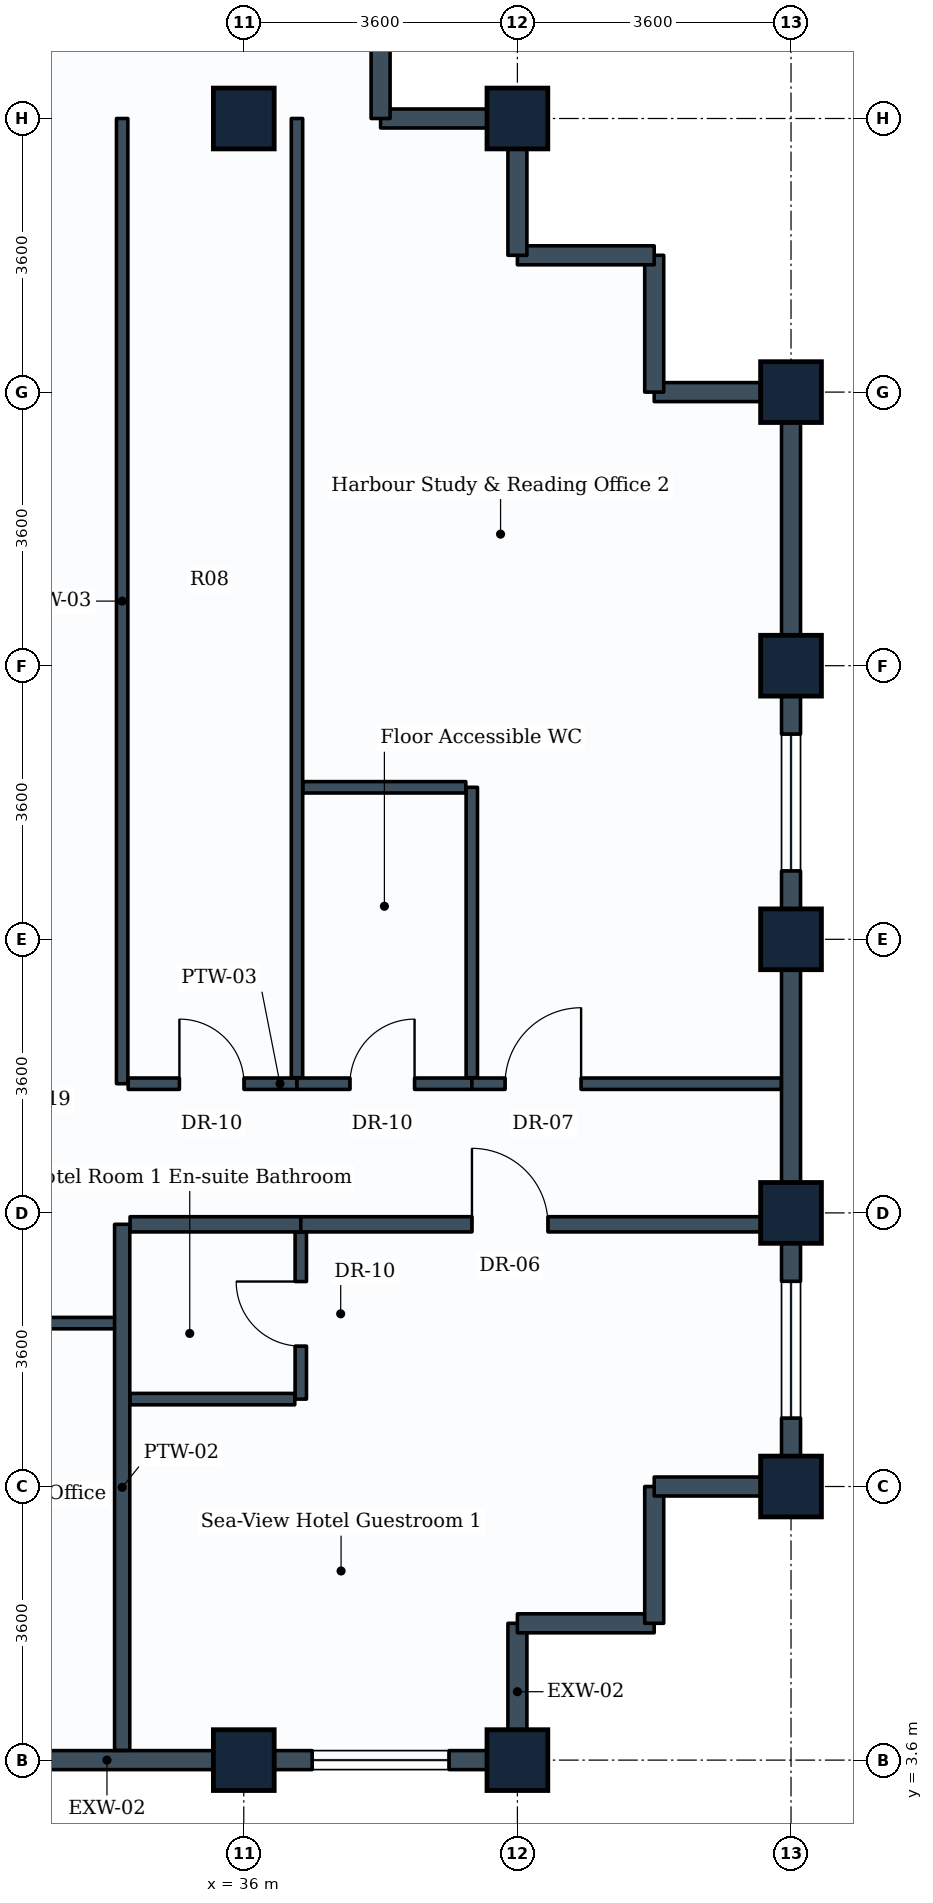
"""IFC4 building model, lengths in metres.
Left out: names, types, materials, properties, quantities, classifications, styles, units other than length and angle.
Written with IfcOpenShell. Run it as: python <this file> out.ifc"""

import sys

from ifc_helpers import new_model, si_unit, direction, frame, frame_2d, origin, origin_2d, place, context, subcontext, project, spatial, rectangle, extrude, element, fill, save


model = new_model("IFC4")
c1 = context("Model", 3, precision=1e-05, world=origin(), true_north=direction((0.0, 1.0)))
c2 = subcontext(c1, "Body", "Model", "MODEL_VIEW")
j1 = project(units=[si_unit("LENGTHUNIT", "METRE"), si_unit("PLANEANGLEUNIT", "RADIAN")], contexts=[c1])
p1 = place(None, origin())
s1 = spatial("IfcSite", under=j1, at=p1, CompositionType="ELEMENT")
p2 = place(p1, origin())
s2 = spatial("IfcBuilding", under=s1, at=p2, CompositionType="ELEMENT")
p3 = place(p2, frame((0.0, 0.0, 281.0)))
s3 = spatial("IfcBuildingStorey", under=s2, at=p3, CompositionType="ELEMENT", Elevation=281.0)
for number, where, z_axis, x_axis in (
    (1, (36.0, 3.6, 0.0), (0.0, 0.0, 1.0), (1.0, 0.0, 0.0)),
    (2, (36.0, 25.2, 0.0), (0.0, 0.0, 1.0), (1.0, 0.0, 0.0)),
    (3, (39.6, 3.6, 0.0), (0.0, 0.0, 1.0), (1.0, 0.0, 0.0)),
    (4, (39.6, 25.2, 0.0), (0.0, 0.0, 1.0), (1.0, 0.0, 0.0)),
    (5, (43.2, 7.2, 0.0), (0.0, 0.0, 1.0), (1.0, 0.0, 0.0)),
    (6, (43.2, 10.8, 0.0), (0.0, 0.0, 1.0), (0.0, 1.0, 0.0)),
    (7, (43.2, 14.4, 0.0), (0.0, 0.0, 1.0), (0.0, 1.0, 0.0)),
    (8, (43.2, 18.0, 0.0), (0.0, 0.0, 1.0), (0.0, 1.0, 0.0)),
    (9, (43.2, 21.6, 0.0), (0.0, 0.0, 1.0), (0.0, 1.0, 0.0)),
):
    element("IfcColumn", number, at=place(p3, frame(where, z_axis=z_axis, x_axis=x_axis)), inside=s3, PredefinedType="COLUMN", context=c2, shape_type="SweptSolid", body=[
        extrude(rectangle(XDim=0.8, YDim=0.8, at=origin_2d()), origin(), (0.0, 0.0, 1.0), 3.6),
    ])
p4 = place(p3, frame((36.0, 3.6, 0.0), z_axis=(0.0, 0.0, 1.0), x_axis=(-1.0, 0.0, 0.0)))
e10 = element("IfcWall", 10, at=p4, inside=s3, PredefinedType="STANDARD", context=c2, shape_type="SweptSolid", body=[
    extrude(rectangle(XDim=3.6, YDim=0.25, at=frame_2d((1.8, 0.0))), origin(), (0.0, 0.0, 1.0), 2.83),
])
p5 = place(p3, frame((39.6, 3.6, 0.0), z_axis=(0.0, 0.0, 1.0), x_axis=(-1.0, 0.0, 0.0)))
e11 = element("IfcWall", 11, at=p5, inside=s3, PredefinedType="STANDARD", context=c2, shape_type="SweptSolid", body=[
    extrude(rectangle(XDim=3.6, YDim=0.25, at=frame_2d((1.8, 0.0))), origin(), (0.0, 0.0, 1.0), 2.83),
])
p6 = place(p5, frame((0.9, 0.0, 0.85)))
e12 = element("IfcOpeningElement", 12, at=p6, cuts=e11, PredefinedType="OPENING", context=c2, shape_type="SweptSolid", body=[
    extrude(rectangle(XDim=1.8, YDim=1.35, at=frame_2d((0.9, 0.675))), frame((0.0, 0.135, 0.0), z_axis=(0.0, -1.0, 0.0), x_axis=(1.0, 0.0, 0.0)), (0.0, 0.0, 1.0), 0.27),
])
p7 = place(p3, frame((39.6, 5.4, 0.0), z_axis=(0.0, 0.0, 1.0), x_axis=(0.0, -1.0, 0.0)))
e13 = element("IfcWall", 13, at=p7, inside=s3, PredefinedType="STANDARD", context=c2, shape_type="SweptSolid", body=[
    extrude(rectangle(XDim=1.8, YDim=0.25, at=frame_2d((0.9, 0.0))), origin(), (0.0, 0.0, 1.0), 2.83),
])
p8 = place(p3, frame((41.4, 5.4, 0.0), z_axis=(0.0, 0.0, 1.0), x_axis=(-1.0, 0.0, 0.0)))
e14 = element("IfcWall", 14, at=p8, inside=s3, PredefinedType="STANDARD", context=c2, shape_type="SweptSolid", body=[
    extrude(rectangle(XDim=1.8, YDim=0.25, at=frame_2d((0.9, 0.0))), origin(), (0.0, 0.0, 1.0), 3.335),
])
p9 = place(p3, frame((41.4, 7.2, 0.0), z_axis=(0.0, 0.0, 1.0), x_axis=(0.0, -1.0, 0.0)))
e15 = element("IfcWall", 15, at=p9, inside=s3, PredefinedType="STANDARD", context=c2, shape_type="SweptSolid", body=[
    extrude(rectangle(XDim=1.8, YDim=0.25, at=frame_2d((0.9, 0.0))), origin(), (0.0, 0.0, 1.0), 3.335),
])
p10 = place(p3, frame((43.2, 7.2, 0.0), z_axis=(0.0, 0.0, 1.0), x_axis=(-1.0, 0.0, 0.0)))
e16 = element("IfcWall", 16, at=p10, inside=s3, PredefinedType="STANDARD", context=c2, shape_type="SweptSolid", body=[
    extrude(rectangle(XDim=1.8, YDim=0.25, at=frame_2d((0.9, 0.0))), origin(), (0.0, 0.0, 1.0), 2.83),
])
p11 = place(p3, frame((43.2, 10.8, 0.0), z_axis=(0.0, 0.0, 1.0), x_axis=(0.0, -1.0, 0.0)))
e17 = element("IfcWall", 17, at=p11, inside=s3, PredefinedType="STANDARD", context=c2, shape_type="SweptSolid", body=[
    extrude(rectangle(XDim=3.6, YDim=0.25, at=frame_2d((1.8, 0.0))), origin(), (0.0, 0.0, 1.0), 2.83),
])
p12 = place(p11, frame((0.9, 0.0, 0.85)))
e18 = element("IfcOpeningElement", 18, at=p12, cuts=e17, PredefinedType="OPENING", context=c2, shape_type="SweptSolid", body=[
    extrude(rectangle(XDim=1.8, YDim=1.35, at=frame_2d((0.9, 0.675))), frame((0.0, 0.135, 0.0), z_axis=(0.0, -1.0, 0.0), x_axis=(1.0, 0.0, 0.0)), (0.0, 0.0, 1.0), 0.27),
])
p13 = place(p3, frame((43.2, 14.4, 0.0), z_axis=(0.0, 0.0, 1.0), x_axis=(0.0, -1.0, 0.0)))
e19 = element("IfcWall", 19, at=p13, inside=s3, PredefinedType="STANDARD", context=c2, shape_type="SweptSolid", body=[
    extrude(rectangle(XDim=3.6, YDim=0.25, at=frame_2d((1.8, 0.0))), origin(), (0.0, 0.0, 1.0), 2.83),
])
p14 = place(p3, frame((43.2, 18.0, 0.0), z_axis=(0.0, 0.0, 1.0), x_axis=(0.0, -1.0, 0.0)))
e20 = element("IfcWall", 20, at=p14, inside=s3, PredefinedType="STANDARD", context=c2, shape_type="SweptSolid", body=[
    extrude(rectangle(XDim=3.6, YDim=0.25, at=frame_2d((1.8, 0.0))), origin(), (0.0, 0.0, 1.0), 2.83),
])
p15 = place(p14, frame((0.9, 0.0, 0.85)))
e21 = element("IfcOpeningElement", 21, at=p15, cuts=e20, PredefinedType="OPENING", context=c2, shape_type="SweptSolid", body=[
    extrude(rectangle(XDim=1.8, YDim=1.35, at=frame_2d((0.9, 0.675))), frame((0.0, 0.135, 0.0), z_axis=(0.0, -1.0, 0.0), x_axis=(1.0, 0.0, 0.0)), (0.0, 0.0, 1.0), 0.27),
])
p16 = place(p3, frame((43.2, 21.6, 0.0), z_axis=(0.0, 0.0, 1.0), x_axis=(0.0, -1.0, 0.0)))
e22 = element("IfcWall", 22, at=p16, inside=s3, PredefinedType="STANDARD", context=c2, shape_type="SweptSolid", body=[
    extrude(rectangle(XDim=3.6, YDim=0.25, at=frame_2d((1.8, 0.0))), origin(), (0.0, 0.0, 1.0), 2.83),
])
p17 = place(p3, frame((41.4, 21.6, 0.0), z_axis=(0.0, 0.0, 1.0), x_axis=(1.0, 0.0, 0.0)))
e23 = element("IfcWall", 23, at=p17, inside=s3, PredefinedType="STANDARD", context=c2, shape_type="SweptSolid", body=[
    extrude(rectangle(XDim=1.8, YDim=0.25, at=frame_2d((0.9, 0.0))), origin(), (0.0, 0.0, 1.0), 2.83),
])
for number, where, z_axis, x_axis in (
    (24, (41.4, 23.4, 0.0), (0.0, 0.0, 1.0), (0.0, -1.0, 0.0)),
    (25, (39.6, 23.4, 0.0), (0.0, 0.0, 1.0), (1.0, 0.0, 0.0)),
):
    element("IfcWall", number, at=place(p3, frame(where, z_axis=z_axis, x_axis=x_axis)), inside=s3, PredefinedType="STANDARD", context=c2, shape_type="SweptSolid", body=[
        extrude(rectangle(XDim=1.8, YDim=0.25, at=frame_2d((0.9, 0.0))), origin(), (0.0, 0.0, 1.0), 3.335),
    ])
for number, where, z_axis, x_axis in (
    (26, (39.6, 25.2, 0.0), (0.0, 0.0, 1.0), (0.0, -1.0, 0.0)),
    (27, (37.8, 25.2, 0.0), (0.0, 0.0, 1.0), (1.0, 0.0, 0.0)),
):
    element("IfcWall", number, at=place(p3, frame(where, z_axis=z_axis, x_axis=x_axis)), inside=s3, PredefinedType="STANDARD", context=c2, shape_type="SweptSolid", body=[
        extrude(rectangle(XDim=1.8, YDim=0.25, at=frame_2d((0.9, 0.0))), origin(), (0.0, 0.0, 1.0), 2.83),
    ])
p18 = place(p3, frame((37.8, 27.3, 0.0), z_axis=(0.0, 0.0, 1.0), x_axis=(0.0, -1.0, 0.0)))
e28 = element("IfcWall", 28, at=p18, inside=s3, PredefinedType="STANDARD", context=c2, shape_type="SweptSolid", body=[
    extrude(rectangle(XDim=2.1, YDim=0.25, at=frame_2d((1.05, 0.0))), origin(), (0.0, 0.0, 1.0), 2.83),
])
p19 = place(p3, frame((34.4, 12.5, 0.0), z_axis=(0.0, 0.0, 1.0), x_axis=(0.0, 1.0, 0.0)))
e29 = element("IfcWall", 29, at=p19, inside=s3, PredefinedType="PARTITIONING", context=c2, shape_type="SweptSolid", body=[
    extrude(rectangle(XDim=12.7, YDim=0.15, at=frame_2d((6.35, 0.0))), origin(), (0.0, 0.0, 1.0), 2.83),
])
p20 = place(p3, frame((34.479, 12.5, 0.0), z_axis=(0.0, 0.0, 1.0), x_axis=(1.0, 0.0, 0.0)))
e30 = element("IfcWall", 30, at=p20, inside=s3, PredefinedType="PARTITIONING", context=c2, shape_type="SweptSolid", body=[
    extrude(rectangle(XDim=2.221, YDim=0.15, at=frame_2d((1.11, 0.0))), origin(), (0.0, 0.0, 1.0), 3.02),
])
p21 = place(p20, frame((0.674, 0.0, 0.0)))
e31 = element("IfcOpeningElement", 31, at=p21, cuts=e30, PredefinedType="OPENING", context=c2, shape_type="SweptSolid", body=[
    extrude(rectangle(XDim=0.85, YDim=2.1, at=frame_2d((0.425, 1.05))), frame((0.0, 0.085, 0.0), z_axis=(0.0, -1.0, 0.0), x_axis=(1.0, 0.0, 0.0)), (0.0, 0.0, 1.0), 0.17),
])
p22 = place(p3, frame((36.7, 12.579, 0.0), z_axis=(0.0, 0.0, 1.0), x_axis=(0.0, 1.0, 0.0)))
e32 = element("IfcWall", 32, at=p22, inside=s3, PredefinedType="PARTITIONING", context=c2, shape_type="SweptSolid", body=[
    extrude(rectangle(XDim=12.621, YDim=0.15, at=frame_2d((6.311, 0.0))), origin(), (0.0, 0.0, 1.0), 2.83),
])
p23 = place(p3, frame((36.7, 12.5, 0.0), z_axis=(0.0, 0.0, 1.0), x_axis=(1.0, 0.0, 0.0)))
e33 = element("IfcWall", 33, at=p23, inside=s3, PredefinedType="PARTITIONING", context=c2, shape_type="SweptSolid", body=[
    extrude(rectangle(XDim=2.3, YDim=0.15, at=frame_2d((1.15, 0.0))), origin(), (0.0, 0.0, 1.0), 3.335),
])
p24 = place(p23, frame((0.697, 0.0, 0.0)))
e34 = element("IfcOpeningElement", 34, at=p24, cuts=e33, PredefinedType="OPENING", context=c2, shape_type="SweptSolid", body=[
    extrude(rectangle(XDim=0.85, YDim=2.1, at=frame_2d((0.425, 1.05))), frame((0.0, 0.085, 0.0), z_axis=(0.0, -1.0, 0.0), x_axis=(1.0, 0.0, 0.0)), (0.0, 0.0, 1.0), 0.17),
])
p25 = place(p3, frame((39.0, 12.579, 0.0), z_axis=(0.0, 0.0, 1.0), x_axis=(0.0, 1.0, 0.0)))
e35 = element("IfcWall", 35, at=p25, inside=s3, PredefinedType="PARTITIONING", context=c2, shape_type="SweptSolid", body=[
    extrude(rectangle(XDim=3.821, YDim=0.15, at=frame_2d((1.91, 0.0))), origin(), (0.0, 0.0, 1.0), 3.03),
])
p26 = place(p3, frame((36.779, 16.4, 0.0), z_axis=(0.0, 0.0, 1.0), x_axis=(1.0, 0.0, 0.0)))
e36 = element("IfcWall", 36, at=p26, inside=s3, PredefinedType="PARTITIONING", context=c2, shape_type="SweptSolid", body=[
    extrude(rectangle(XDim=2.142, YDim=0.15, at=frame_2d((1.071, 0.0))), origin(), (0.0, 0.0, 1.0), 3.335),
])
p27 = place(p3, frame((28.879, 9.35, 0.0), z_axis=(0.0, 0.0, 1.0), x_axis=(1.0, 0.0, 0.0)))
e37 = element("IfcWall", 37, at=p27, inside=s3, PredefinedType="PARTITIONING", context=c2, shape_type="SweptSolid", body=[
    extrude(rectangle(XDim=5.521, YDim=0.15, at=frame_2d((2.76, 0.0))), origin(), (0.0, 0.0, 1.0), 3.335),
])
p28 = place(p27, frame((0.36, 0.0, 0.0)))
e38 = element("IfcOpeningElement", 38, at=p28, cuts=e37, PredefinedType="OPENING", context=c2, shape_type="SweptSolid", body=[
    extrude(rectangle(XDim=1.0, YDim=2.1, at=frame_2d((0.5, 1.05))), frame((0.0, 0.085, 0.0), z_axis=(0.0, -1.0, 0.0), x_axis=(1.0, 0.0, 0.0)), (0.0, 0.0, 1.0), 0.17),
])
p29 = place(p3, frame((34.4, 3.729, 0.0), z_axis=(0.0, 0.0, 1.0), x_axis=(0.0, 1.0, 0.0)))
e39 = element("IfcWall", 39, at=p29, inside=s3, PredefinedType="PARTITIONING", context=c2, shape_type="SweptSolid", body=[
    extrude(rectangle(XDim=6.921, YDim=0.2, at=frame_2d((3.46, 0.0))), origin(), (0.0, 0.0, 1.0), 2.83),
])
p30 = place(p3, frame((34.504, 10.65, 0.0), z_axis=(0.0, 0.0, 1.0), x_axis=(1.0, 0.0, 0.0)))
e40 = element("IfcWall", 40, at=p30, inside=s3, PredefinedType="PARTITIONING", context=c2, shape_type="SweptSolid", body=[
    extrude(rectangle(XDim=2.246, YDim=0.2, at=frame_2d((1.123, 0.0))), origin(), (0.0, 0.0, 1.0), 3.02),
])
p31 = place(p3, frame((36.75, 10.65, 0.0), z_axis=(0.0, 0.0, 1.0), x_axis=(1.0, 0.0, 0.0)))
e41 = element("IfcWall", 41, at=p31, inside=s3, PredefinedType="PARTITIONING", context=c2, shape_type="SweptSolid", body=[
    extrude(rectangle(XDim=6.321, YDim=0.2, at=frame_2d((3.161, 0.0))), origin(), (0.0, 0.0, 1.0), 2.83),
])
p32 = place(p31, frame((2.252, 0.0, 0.0)))
e42 = element("IfcOpeningElement", 42, at=p32, cuts=e41, PredefinedType="OPENING", context=c2, shape_type="SweptSolid", body=[
    extrude(rectangle(XDim=1.0, YDim=2.1, at=frame_2d((0.5, 1.05))), frame((0.0, 0.11, 0.0), z_axis=(0.0, -1.0, 0.0), x_axis=(1.0, 0.0, 0.0)), (0.0, 0.0, 1.0), 0.22),
])
p33 = place(p3, frame((36.75, 8.35, 0.0), z_axis=(0.0, 0.0, 1.0), x_axis=(0.0, 1.0, 0.0)))
e43 = element("IfcWall", 43, at=p33, inside=s3, PredefinedType="PARTITIONING", context=c2, shape_type="SweptSolid", body=[
    extrude(rectangle(XDim=2.196, YDim=0.15, at=frame_2d((1.098, 0.0))), origin(), (0.0, 0.0, 1.0), 3.335),
])
p34 = place(p33, frame((0.697, 0.0, 0.0)))
e44 = element("IfcOpeningElement", 44, at=p34, cuts=e43, PredefinedType="OPENING", context=c2, shape_type="SweptSolid", body=[
    extrude(rectangle(XDim=0.85, YDim=2.1, at=frame_2d((0.425, 1.05))), frame((0.0, 0.085, 0.0), z_axis=(0.0, -1.0, 0.0), x_axis=(1.0, 0.0, 0.0)), (0.0, 0.0, 1.0), 0.17),
])
p35 = place(p3, frame((34.504, 8.35, 0.0), z_axis=(0.0, 0.0, 1.0), x_axis=(1.0, 0.0, 0.0)))
e45 = element("IfcWall", 45, at=p35, inside=s3, PredefinedType="PARTITIONING", context=c2, shape_type="SweptSolid", body=[
    extrude(rectangle(XDim=2.167, YDim=0.15, at=frame_2d((1.083, 0.0))), origin(), (0.0, 0.0, 1.0), 3.02),
])
p36 = place(p3, frame((39.0, 12.5, 0.0), z_axis=(0.0, 0.0, 1.0), x_axis=(1.0, 0.0, 0.0)))
e46 = element("IfcWall", 46, at=p36, inside=s3, PredefinedType="PARTITIONING", context=c2, shape_type="SweptSolid", body=[
    extrude(rectangle(XDim=4.071, YDim=0.15, at=frame_2d((2.036, 0.0))), origin(), (0.0, 0.0, 1.0), 2.83),
])
p37 = place(p36, frame((0.438, 0.0, 0.0)))
e47 = element("IfcOpeningElement", 47, at=p37, cuts=e46, PredefinedType="OPENING", context=c2, shape_type="SweptSolid", body=[
    extrude(rectangle(XDim=1.0, YDim=2.1, at=frame_2d((0.5, 1.05))), frame((0.0, 0.085, 0.0), z_axis=(0.0, -1.0, 0.0), x_axis=(1.0, 0.0, 0.0)), (0.0, 0.0, 1.0), 0.17),
])
p38 = place(p6, origin())
e48 = element("IfcWindow", 48, at=p38, inside=s3, PartitioningType="SINGLE_PANEL", PredefinedType="WINDOW", context=c2, shape_type="SweptSolid", body=[
    extrude(rectangle(XDim=1.8, YDim=1.35, at=frame_2d((0.9, 0.675))), frame((0.0, 0.03, 0.0), z_axis=(0.0, -1.0, 0.0), x_axis=(1.0, 0.0, 0.0)), (0.0, 0.0, 1.0), 0.06),
])
fill(e12, e48)
p39 = place(p12, origin())
e49 = element("IfcWindow", 49, at=p39, inside=s3, PartitioningType="SINGLE_PANEL", PredefinedType="WINDOW", context=c2, shape_type="SweptSolid", body=[
    extrude(rectangle(XDim=1.8, YDim=1.35, at=frame_2d((0.9, 0.675))), frame((0.0, 0.03, 0.0), z_axis=(0.0, -1.0, 0.0), x_axis=(1.0, 0.0, 0.0)), (0.0, 0.0, 1.0), 0.06),
])
fill(e18, e49)
p40 = place(p15, origin())
e50 = element("IfcWindow", 50, at=p40, inside=s3, PartitioningType="SINGLE_PANEL", PredefinedType="WINDOW", context=c2, shape_type="SweptSolid", body=[
    extrude(rectangle(XDim=1.8, YDim=1.35, at=frame_2d((0.9, 0.675))), frame((0.0, 0.03, 0.0), z_axis=(0.0, -1.0, 0.0), x_axis=(1.0, 0.0, 0.0)), (0.0, 0.0, 1.0), 0.06),
])
fill(e21, e50)
p41 = place(p21, origin())
e51 = element("IfcDoor", 51, at=p41, inside=s3, OperationType="SINGLE_SWING_LEFT", PredefinedType="DOOR", context=c2, shape_type="SweptSolid", body=[
    extrude(rectangle(XDim=0.85, YDim=2.1, at=frame_2d((0.425, 1.05))), frame((0.0, 0.025, 0.0), z_axis=(0.0, -1.0, 0.0), x_axis=(1.0, 0.0, 0.0)), (0.0, 0.0, 1.0), 0.05),
])
fill(e31, e51)
p42 = place(p24, origin())
e52 = element("IfcDoor", 52, at=p42, inside=s3, OperationType="SINGLE_SWING_RIGHT", PredefinedType="DOOR", context=c2, shape_type="SweptSolid", body=[
    extrude(rectangle(XDim=0.85, YDim=2.1, at=frame_2d((0.425, 1.05))), frame((0.0, 0.025, 0.0), z_axis=(0.0, -1.0, 0.0), x_axis=(1.0, 0.0, 0.0)), (0.0, 0.0, 1.0), 0.05),
])
fill(e34, e52)
p43 = place(p32, origin())
e53 = element("IfcDoor", 53, at=p43, inside=s3, OperationType="SINGLE_SWING_LEFT", PredefinedType="DOOR", context=c2, shape_type="SweptSolid", body=[
    extrude(rectangle(XDim=1.0, YDim=2.1, at=frame_2d((0.5, 1.05))), frame((0.0, 0.025, 0.0), z_axis=(0.0, -1.0, 0.0), x_axis=(1.0, 0.0, 0.0)), (0.0, 0.0, 1.0), 0.05),
])
fill(e42, e53)
p44 = place(p34, origin())
e54 = element("IfcDoor", 54, at=p44, inside=s3, OperationType="SINGLE_SWING_RIGHT", PredefinedType="DOOR", context=c2, shape_type="SweptSolid", body=[
    extrude(rectangle(XDim=0.85, YDim=2.1, at=frame_2d((0.425, 1.05))), frame((0.0, 0.025, 0.0), z_axis=(0.0, -1.0, 0.0), x_axis=(1.0, 0.0, 0.0)), (0.0, 0.0, 1.0), 0.05),
])
fill(e44, e54)
p45 = place(p37, origin())
e55 = element("IfcDoor", 55, at=p45, inside=s3, OperationType="SINGLE_SWING_RIGHT", PredefinedType="DOOR", context=c2, shape_type="SweptSolid", body=[
    extrude(rectangle(XDim=1.0, YDim=2.1, at=frame_2d((0.5, 1.05))), frame((0.0, 0.025, 0.0), z_axis=(0.0, -1.0, 0.0), x_axis=(1.0, 0.0, 0.0)), (0.0, 0.0, 1.0), 0.05),
])
fill(e47, e55)
save(model, sys.argv[1])
